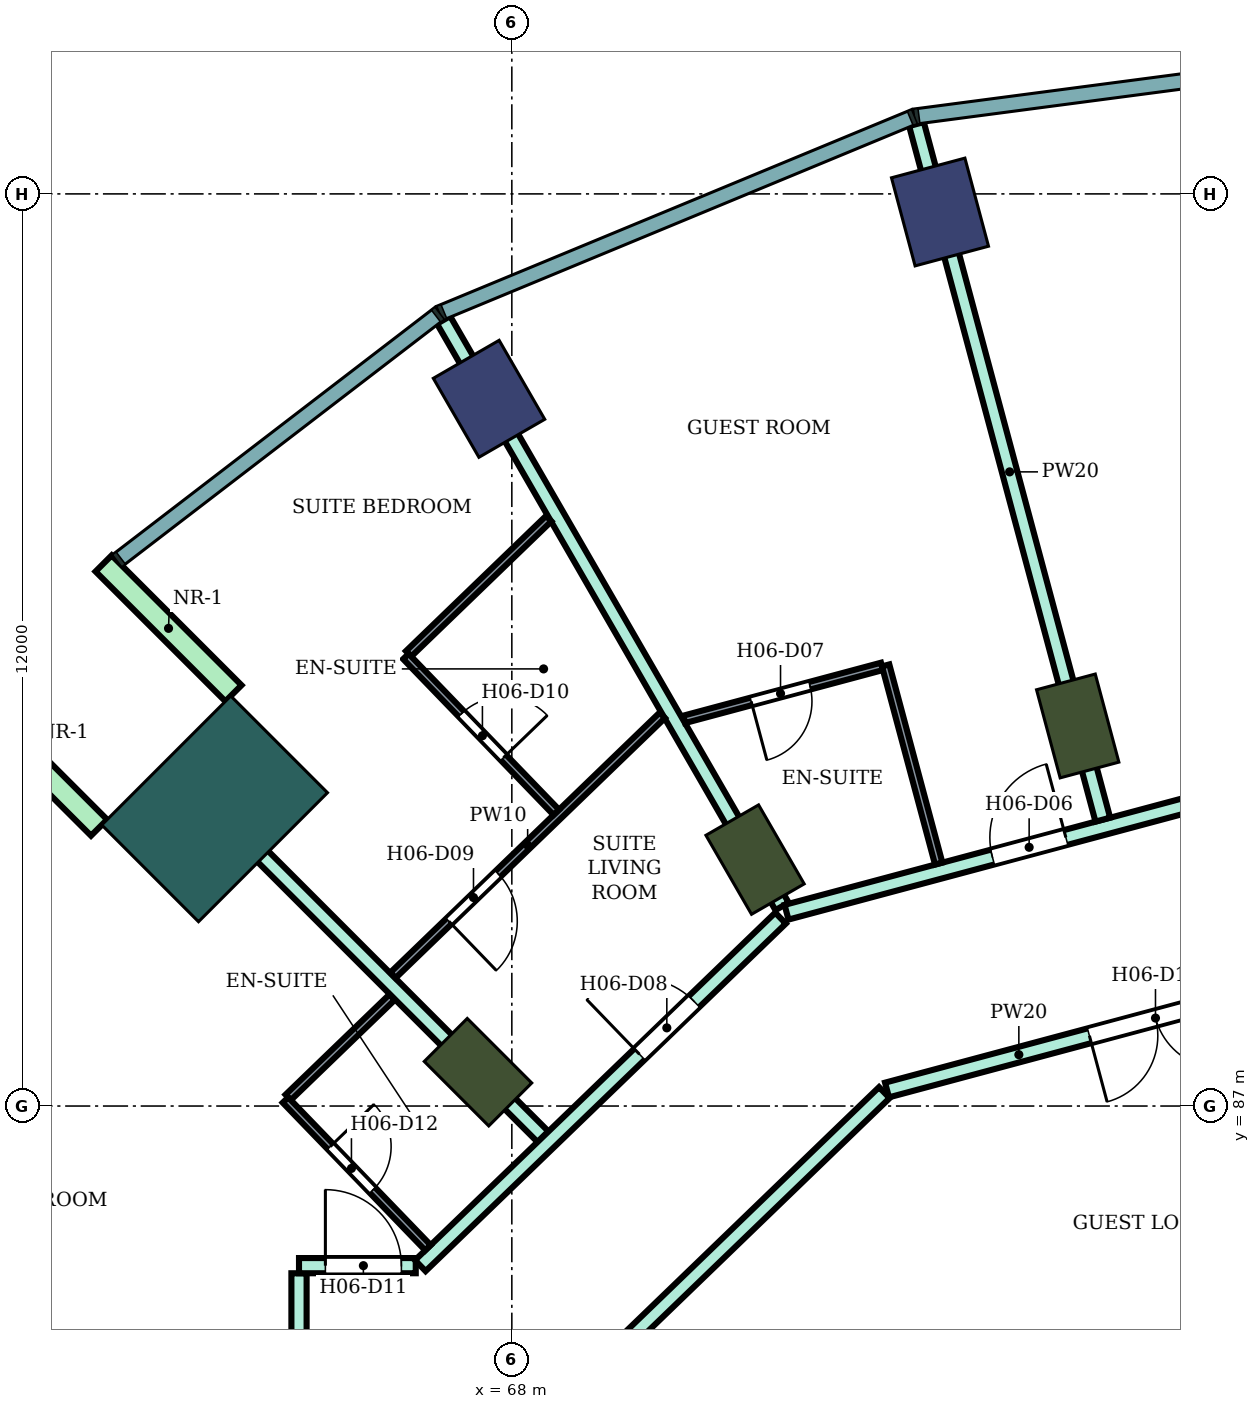
"""IFC4 building model, lengths in metres.
Left out: names, types, materials, properties, quantities, classifications, styles, units other than length and angle.
Written with IfcOpenShell. Run it as: python <this file> out.ifc"""

import sys

from ifc_helpers import new_model, si_unit, direction, frame, frame_2d, origin, origin_2d, place, context, subcontext, project, spatial, rectangle, extrude, element, fill, save


model = new_model("IFC4")
c1 = context("Model", 3, precision=1e-05, world=origin(), true_north=direction((0.0, 1.0)))
c2 = subcontext(c1, "Body", "Model", "MODEL_VIEW")
j1 = project(units=[si_unit("LENGTHUNIT", "METRE"), si_unit("PLANEANGLEUNIT", "RADIAN")], contexts=[c1])
p1 = place(None, origin())
s1 = spatial("IfcSite", under=j1, at=p1, CompositionType="ELEMENT")
p2 = place(p1, origin())
s2 = spatial("IfcBuilding", under=s1, at=p2, CompositionType="ELEMENT")
p3 = place(p2, frame((0.0, 0.0, 101.4)))
s3 = spatial("IfcBuildingStorey", under=s2, at=p3, CompositionType="ELEMENT", Elevation=101.4)
for number, where, z_axis, x_axis in (
    (1, (73.633, 98.762, 0.0), (0.0, 0.0, 1.0), (-0.259, 0.966, 0.0)),
    (2, (67.7, 96.304, 0.0), (0.0, 0.0, 1.0), (-0.5, 0.866, 0.0)),
):
    element("IfcColumn", number, at=place(p3, frame(where, z_axis=z_axis, x_axis=x_axis)), inside=s3, PredefinedType="COLUMN", context=c2, shape_type="SweptSolid", body=[
        extrude(rectangle(XDim=1.2, YDim=1.0, at=origin_2d()), origin(), (0.0, 0.0, 1.0), 3.8),
    ])
for number, where, z_axis, x_axis in (
    (3, (75.445, 92.0, 0.0), (0.0, 0.0, 1.0), (-0.259, 0.966, 0.0)),
    (4, (71.2, 90.242, 0.0), (0.0, 0.0, 1.0), (-0.5, 0.866, 0.0)),
    (5, (67.555, 87.445, 0.0), (0.0, 0.0, 1.0), (-0.707, 0.707, 0.0)),
):
    element("IfcColumn", number, at=place(p3, frame(where, z_axis=z_axis, x_axis=x_axis)), inside=s3, PredefinedType="COLUMN", context=c2, shape_type="SweptSolid", body=[
        extrude(rectangle(XDim=1.2, YDim=0.8, at=origin_2d()), origin(), (0.0, 0.0, 1.0), 3.8),
    ])
p4 = place(p3, frame((64.09, 90.91, 0.0), z_axis=(0.0, 0.0, 1.0), x_axis=(-0.707106781187, 0.707106781187, 0.0)))
e6 = element("IfcColumn", 6, at=p4, inside=s3, PredefinedType="COLUMN", context=c2, shape_type="SweptSolid", body=[
    extrude(rectangle(XDim=1.8, YDim=2.4, at=origin_2d()), origin(), (0.0, 0.0, 1.0), 3.8),
])
for number, where, z_axis, x_axis in (
    (7, (64.338, 92.43, 0.0), (0.0, 0.0, 1.0), (-0.707, 0.707, 0.0)),
    (8, (62.57, 90.662, 0.0), (0.0, 0.0, 1.0), (-0.707, 0.707, 0.0)),
):
    element("IfcWall", number, at=place(p3, frame(where, z_axis=z_axis, x_axis=x_axis)), inside=s3, PredefinedType="NOTDEFINED", context=c2, shape_type="SweptSolid", body=[
        extrude(rectangle(XDim=2.416, YDim=0.3, at=frame_2d((1.208, 0.0))), origin(), (0.0, 0.0, 1.0), 3.8),
    ])
p5 = place(p3, frame((63.6, 91.409, 0.0), z_axis=(0.0, 0.0, 1.0), x_axis=(0.706945318761, -0.707268206752, 0.0)))
e9 = element("IfcWall", 9, at=p5, inside=s3, PredefinedType="PARTITIONING", context=c2, shape_type="SweptSolid", body=[
    extrude(rectangle(XDim=6.805, YDim=0.2, at=frame_2d((3.402, 0.0))), origin(), (0.0, 0.0, 1.0), 3.35),
])
p6 = place(p3, frame((65.2, 83.401, 0.0), z_axis=(0.0, 0.0, 1.0), x_axis=(0.0, 1.0, 0.0)))
e10 = element("IfcWall", 10, at=p6, inside=s3, PredefinedType="PARTITIONING", context=c2, shape_type="SweptSolid", body=[
    extrude(rectangle(XDim=1.399, YDim=0.2, at=frame_2d((0.7, 0.0))), origin(), (0.0, 0.0, 1.0), 3.35),
])
p7 = place(p3, frame((65.2, 84.9, 0.0), z_axis=(0.0, 0.0, 1.0), x_axis=(1.0, 0.0, 0.0)))
e11 = element("IfcWall", 11, at=p7, inside=s3, PredefinedType="PARTITIONING", context=c2, shape_type="SweptSolid", body=[
    extrude(rectangle(XDim=1.536, YDim=0.2, at=frame_2d((0.768, 0.0))), origin(), (0.0, 0.0, 1.0), 3.35),
])
p8 = place(p7, frame((0.347, 0.0, 0.0)))
e12 = element("IfcOpeningElement", 12, at=p8, cuts=e11, PredefinedType="OPENING", context=c2, shape_type="SweptSolid", body=[
    extrude(rectangle(XDim=1.0, YDim=2.1, at=frame_2d((0.5, 1.05))), frame((0.0, 0.11, 0.0), z_axis=(0.0, -1.0, 0.0), x_axis=(1.0, 0.0, 0.0)), (0.0, 0.0, 1.0), 0.22),
])
p9 = place(p3, frame((66.796, 84.9, 0.0), z_axis=(0.0, 0.0, 1.0), x_axis=(0.719690784855, 0.694294731505, 0.0)))
e13 = element("IfcWall", 13, at=p9, inside=s3, PredefinedType="PARTITIONING", context=c2, shape_type="SweptSolid", body=[
    extrude(rectangle(XDim=6.585, YDim=0.2, at=frame_2d((3.292, 0.0))), origin(), (0.0, 0.0, 1.0), 3.35),
])
p10 = place(p9, frame((4.006, 0.0, 0.0)))
e14 = element("IfcOpeningElement", 14, at=p10, cuts=e13, PredefinedType="OPENING", context=c2, shape_type="SweptSolid", body=[
    extrude(rectangle(XDim=1.0, YDim=2.1, at=frame_2d((0.5, 1.05))), frame((0.0, 0.11, 0.0), z_axis=(0.0, -1.0, 0.0), x_axis=(1.0, 0.0, 0.0)), (0.0, 0.0, 1.0), 0.22),
])
p11 = place(p3, frame((67.102, 97.342, 0.0), z_axis=(0.0, 0.0, 1.0), x_axis=(0.499900389553, -0.866082906265, 0.0)))
e15 = element("IfcWall", 15, at=p11, inside=s3, PredefinedType="PARTITIONING", context=c2, shape_type="SweptSolid", body=[
    extrude(rectangle(XDim=8.908, YDim=0.2, at=frame_2d((4.454, 0.0))), origin(), (0.0, 0.0, 1.0), 3.35),
])
p12 = place(p3, frame((68.987, 83.4, 0.0), z_axis=(0.0, 0.0, 1.0), x_axis=(0.719586298962, 0.694403022997, 0.0)))
e16 = element("IfcWall", 16, at=p12, inside=s3, PredefinedType="PARTITIONING", context=c2, shape_type="SweptSolid", body=[
    extrude(rectangle(XDim=5.439, YDim=0.2, at=frame_2d((2.719, 0.0))), origin(), (0.0, 0.0, 1.0), 3.35),
])
p13 = place(p3, frame((71.614, 89.55, 0.0), z_axis=(0.0, 0.0, 1.0), x_axis=(0.965982378603, 0.258607896685, 0.0)))
e17 = element("IfcWall", 17, at=p13, inside=s3, PredefinedType="PARTITIONING", context=c2, shape_type="SweptSolid", body=[
    extrude(rectangle(XDim=8.632, YDim=0.2, at=frame_2d((4.316, 0.0))), origin(), (0.0, 0.0, 1.0), 3.35),
])
p14 = place(p13, frame((2.804, 0.0, 0.0)))
e18 = element("IfcOpeningElement", 18, at=p14, cuts=e17, PredefinedType="OPENING", context=c2, shape_type="SweptSolid", body=[
    extrude(rectangle(XDim=1.0, YDim=2.1, at=frame_2d((0.5, 1.05))), frame((0.0, 0.11, 0.0), z_axis=(0.0, -1.0, 0.0), x_axis=(1.0, 0.0, 0.0)), (0.0, 0.0, 1.0), 0.22),
])
p15 = place(p3, frame((72.936, 87.211, 0.0), z_axis=(0.0, 0.0, 1.0), x_axis=(0.965917703859, 0.258849356521, 0.0)))
e19 = element("IfcWall", 19, at=p15, inside=s3, PredefinedType="PARTITIONING", context=c2, shape_type="SweptSolid", body=[
    extrude(rectangle(XDim=7.182, YDim=0.2, at=frame_2d((3.591, 0.0))), origin(), (0.0, 0.0, 1.0), 3.35),
])
p16 = place(p15, frame((2.757, 0.0, 0.0)))
e20 = element("IfcOpeningElement", 20, at=p16, cuts=e19, PredefinedType="OPENING", context=c2, shape_type="SweptSolid", body=[
    extrude(rectangle(XDim=1.8, YDim=2.1, at=frame_2d((0.9, 1.05))), frame((0.0, 0.11, 0.0), z_axis=(0.0, -1.0, 0.0), x_axis=(1.0, 0.0, 0.0)), (0.0, 0.0, 1.0), 0.22),
])
p17 = place(p3, frame((73.323, 99.918, 0.0), z_axis=(0.0, 0.0, 1.0), x_axis=(0.258812513968, -0.965927576278, 0.0)))
e21 = element("IfcWall", 21, at=p17, inside=s3, PredefinedType="PARTITIONING", context=c2, shape_type="SweptSolid", body=[
    extrude(rectangle(XDim=9.474, YDim=0.2, at=frame_2d((4.737, 0.0))), origin(), (0.0, 0.0, 1.0), 3.35),
])
p18 = place(p3, frame((65.058, 87.114, 0.0), z_axis=(0.0, 0.0, 1.0), x_axis=(0.719653890619, 0.694332973232, 0.0)))
e22 = element("IfcWall", 22, at=p18, inside=s3, PredefinedType="PARTITIONING", context=c2, shape_type="SweptSolid", body=[
    extrude(rectangle(XDim=1.899, YDim=0.1, at=frame_2d((0.95, 0.0))), origin(), (0.0, 0.0, 1.0), 3.35),
])
p19 = place(p3, frame((65.022, 87.079, 0.0), z_axis=(0.0, 0.0, 1.0), x_axis=(0.694287838235, -0.719697434815, 0.0)))
e23 = element("IfcWall", 23, at=p19, inside=s3, PredefinedType="PARTITIONING", context=c2, shape_type="SweptSolid", body=[
    extrude(rectangle(XDim=2.7, YDim=0.1, at=frame_2d((1.35, 0.0))), origin(), (0.0, 0.0, 1.0), 3.35),
])
p20 = place(p19, frame((0.85, 0.0, 0.0)))
e24 = element("IfcOpeningElement", 24, at=p20, cuts=e23, PredefinedType="OPENING", context=c2, shape_type="SweptSolid", body=[
    extrude(rectangle(XDim=0.8, YDim=2.1, at=frame_2d((0.4, 1.05))), frame((0.0, 0.06, 0.0), z_axis=(0.0, -1.0, 0.0), x_axis=(1.0, 0.0, 0.0)), (0.0, 0.0, 1.0), 0.12),
])
p21 = place(p3, frame((66.436, 88.72, 0.0), z_axis=(0.0, 0.0, 1.0), x_axis=(0.719585934284, 0.694403400899, 0.0)))
e25 = element("IfcWall", 25, at=p21, inside=s3, PredefinedType="PARTITIONING", context=c2, shape_type="SweptSolid", body=[
    extrude(rectangle(XDim=4.925, YDim=0.1, at=frame_2d((2.462, 0.0))), origin(), (0.0, 0.0, 1.0), 3.35),
])
p22 = place(p21, frame((1.022, 0.0, 0.0)))
e26 = element("IfcOpeningElement", 26, at=p22, cuts=e25, PredefinedType="OPENING", context=c2, shape_type="SweptSolid", body=[
    extrude(rectangle(XDim=0.9, YDim=2.1, at=frame_2d((0.45, 1.05))), frame((0.0, 0.06, 0.0), z_axis=(0.0, -1.0, 0.0), x_axis=(1.0, 0.0, 0.0)), (0.0, 0.0, 1.0), 0.12),
])
p23 = place(p3, frame((66.642, 92.95, 0.0), z_axis=(0.0, 0.0, 1.0), x_axis=(0.719667412702, 0.694318957753, 0.0)))
e27 = element("IfcWall", 27, at=p23, inside=s3, PredefinedType="PARTITIONING", context=c2, shape_type="SweptSolid", body=[
    extrude(rectangle(XDim=2.562, YDim=0.1, at=frame_2d((1.281, 0.0))), origin(), (0.0, 0.0, 1.0), 3.35),
])
p24 = place(p3, frame((66.606, 92.915, 0.0), z_axis=(0.0, 0.0, 1.0), x_axis=(0.694403413121, -0.71958592249, 0.0)))
e28 = element("IfcWall", 28, at=p24, inside=s3, PredefinedType="PARTITIONING", context=c2, shape_type="SweptSolid", body=[
    extrude(rectangle(XDim=2.85, YDim=0.1, at=frame_2d((1.425, 0.0))), origin(), (0.0, 0.0, 1.0), 3.35),
])
p25 = place(p24, frame((1.05, 0.0, 0.0)))
e29 = element("IfcOpeningElement", 29, at=p25, cuts=e28, PredefinedType="OPENING", context=c2, shape_type="SweptSolid", body=[
    extrude(rectangle(XDim=0.8, YDim=2.1, at=frame_2d((0.4, 1.05))), frame((0.0, 0.06, 0.0), z_axis=(0.0, -1.0, 0.0), x_axis=(1.0, 0.0, 0.0)), (0.0, 0.0, 1.0), 0.12),
])
p26 = place(p3, frame((70.268, 92.087, 0.0), z_axis=(0.0, 0.0, 1.0), x_axis=(0.965937937835, 0.258773839966, 0.0)))
e30 = element("IfcWall", 30, at=p26, inside=s3, PredefinedType="PARTITIONING", context=c2, shape_type="SweptSolid", body=[
    extrude(rectangle(XDim=2.694, YDim=0.1, at=frame_2d((1.347, 0.0))), origin(), (0.0, 0.0, 1.0), 3.35),
])
p27 = place(p26, frame((0.912, 0.0, 0.0)))
e31 = element("IfcOpeningElement", 31, at=p27, cuts=e30, PredefinedType="OPENING", context=c2, shape_type="SweptSolid", body=[
    extrude(rectangle(XDim=0.8, YDim=2.1, at=frame_2d((0.4, 1.05))), frame((0.0, 0.06, 0.0), z_axis=(0.0, -1.0, 0.0), x_axis=(1.0, 0.0, 0.0)), (0.0, 0.0, 1.0), 0.12),
])
p28 = place(p3, frame((72.918, 92.797, 0.0), z_axis=(0.0, 0.0, 1.0), x_axis=(0.25867580527, -0.965964195904, 0.0)))
e32 = element("IfcWall", 32, at=p28, inside=s3, PredefinedType="PARTITIONING", context=c2, shape_type="SweptSolid", body=[
    extrude(rectangle(XDim=2.699, YDim=0.1, at=frame_2d((1.35, 0.0))), origin(), (0.0, 0.0, 1.0), 3.35),
])
p29 = place(p14, origin())
e33 = element("IfcDoor", 33, at=p29, inside=s3, OperationType="SINGLE_SWING_RIGHT", PredefinedType="DOOR", context=c2, shape_type="SweptSolid", body=[
    extrude(rectangle(XDim=1.0, YDim=2.1, at=frame_2d((0.5, 1.05))), frame((0.0, 0.025, 0.0), z_axis=(0.0, -1.0, 0.0), x_axis=(1.0, 0.0, 0.0)), (0.0, 0.0, 1.0), 0.05),
])
fill(e18, e33)
p30 = place(p27, frame((0.8, 0.0, 0.0), z_axis=(0.0, 0.0, 1.0), x_axis=(-1.0, 0.0, 0.0)))
e34 = element("IfcDoor", 34, at=p30, inside=s3, OperationType="SINGLE_SWING_RIGHT", PredefinedType="DOOR", context=c2, shape_type="SweptSolid", body=[
    extrude(rectangle(XDim=0.8, YDim=2.1, at=frame_2d((0.4, 1.05))), frame((0.0, 0.025, 0.0), z_axis=(0.0, -1.0, 0.0), x_axis=(1.0, 0.0, 0.0)), (0.0, 0.0, 1.0), 0.05),
])
fill(e31, e34)
p31 = place(p10, origin())
e35 = element("IfcDoor", 35, at=p31, inside=s3, OperationType="SINGLE_SWING_LEFT", PredefinedType="DOOR", context=c2, shape_type="SweptSolid", body=[
    extrude(rectangle(XDim=1.0, YDim=2.1, at=frame_2d((0.5, 1.05))), frame((0.0, 0.025, 0.0), z_axis=(0.0, -1.0, 0.0), x_axis=(1.0, 0.0, 0.0)), (0.0, 0.0, 1.0), 0.05),
])
fill(e14, e35)
p32 = place(p22, frame((0.9, 0.0, 0.0), z_axis=(0.0, 0.0, 1.0), x_axis=(-1.0, 0.0, 0.0)))
e36 = element("IfcDoor", 36, at=p32, inside=s3, OperationType="SINGLE_SWING_RIGHT", PredefinedType="DOOR", context=c2, shape_type="SweptSolid", body=[
    extrude(rectangle(XDim=0.9, YDim=2.1, at=frame_2d((0.45, 1.05))), frame((0.0, 0.025, 0.0), z_axis=(0.0, -1.0, 0.0), x_axis=(1.0, 0.0, 0.0)), (0.0, 0.0, 1.0), 0.05),
])
fill(e26, e36)
p33 = place(p25, origin())
e37 = element("IfcDoor", 37, at=p33, inside=s3, OperationType="SINGLE_SWING_RIGHT", PredefinedType="DOOR", context=c2, shape_type="SweptSolid", body=[
    extrude(rectangle(XDim=0.8, YDim=2.1, at=frame_2d((0.4, 1.05))), frame((0.0, 0.025, 0.0), z_axis=(0.0, -1.0, 0.0), x_axis=(1.0, 0.0, 0.0)), (0.0, 0.0, 1.0), 0.05),
])
fill(e29, e37)
p34 = place(p8, origin())
e38 = element("IfcDoor", 38, at=p34, inside=s3, OperationType="SINGLE_SWING_LEFT", PredefinedType="DOOR", context=c2, shape_type="SweptSolid", body=[
    extrude(rectangle(XDim=1.0, YDim=2.1, at=frame_2d((0.5, 1.05))), frame((0.0, 0.025, 0.0), z_axis=(0.0, -1.0, 0.0), x_axis=(1.0, 0.0, 0.0)), (0.0, 0.0, 1.0), 0.05),
])
fill(e12, e38)
p35 = place(p20, origin())
e39 = element("IfcDoor", 39, at=p35, inside=s3, OperationType="SINGLE_SWING_LEFT", PredefinedType="DOOR", context=c2, shape_type="SweptSolid", body=[
    extrude(rectangle(XDim=0.8, YDim=2.1, at=frame_2d((0.4, 1.05))), frame((0.0, 0.025, 0.0), z_axis=(0.0, -1.0, 0.0), x_axis=(1.0, 0.0, 0.0)), (0.0, 0.0, 1.0), 0.05),
])
fill(e24, e39)
p36 = place(p16, frame((1.8, 0.0, 0.0), z_axis=(0.0, 0.0, 1.0), x_axis=(-1.0, 0.0, 0.0)))
e40 = element("IfcDoor", 40, at=p36, inside=s3, OperationType="DOUBLE_DOOR_SINGLE_SWING", PredefinedType="DOOR", context=c2, shape_type="SweptSolid", body=[
    extrude(rectangle(XDim=1.8, YDim=2.1, at=frame_2d((0.9, 1.05))), frame((0.0, 0.025, 0.0), z_axis=(0.0, -1.0, 0.0), x_axis=(1.0, 0.0, 0.0)), (0.0, 0.0, 1.0), 0.05),
])
fill(e20, e40)
save(model, sys.argv[1])
